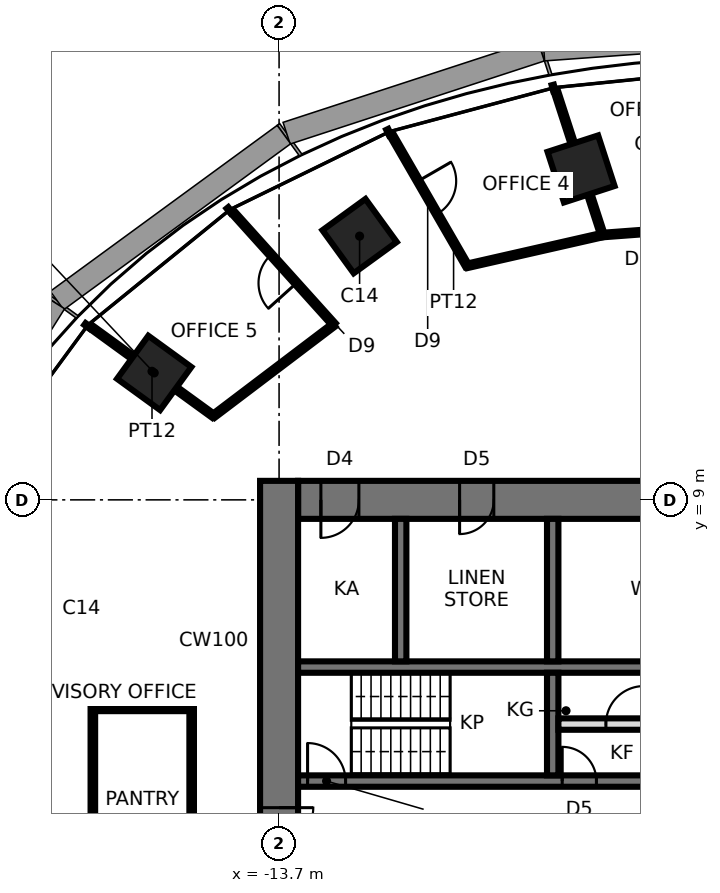
"""IFC4 building model, lengths in metres.
Left out: names, types, materials, properties, quantities, classifications, styles, units other than length and angle.
Written with IfcOpenShell. Run it as: python <this file> out.ifc"""

import sys

from ifc_helpers import new_model, si_unit, direction, frame, frame_2d, origin, origin_2d, place, context, subcontext, project, spatial, rectangle, extrude, element, fill, save


model = new_model("IFC4")
c1 = context("Model", 3, precision=1e-05, world=origin(), true_north=direction((0.0, 1.0)))
c2 = subcontext(c1, "Body", "Model", "MODEL_VIEW")
j1 = project(units=[si_unit("LENGTHUNIT", "METRE"), si_unit("PLANEANGLEUNIT", "RADIAN")], contexts=[c1])
p1 = place(None, origin())
s1 = spatial("IfcSite", under=j1, at=p1, CompositionType="ELEMENT")
p2 = place(p1, origin())
s2 = spatial("IfcBuilding", under=s1, at=p2, CompositionType="ELEMENT")
p3 = place(p2, frame((0.0, 0.0, 187.7)))
s3 = spatial("IfcBuildingStorey", under=s2, at=p3, CompositionType="ELEMENT", Elevation=187.7)
for number, where, z_axis, x_axis in (
    (1, (-5.754, 17.708, 0.0), (0.0, 0.0, 1.0), (-0.309, 0.951, 0.0)),
    (2, (-11.581, 15.94, 0.0), (0.0, 0.0, 1.0), (-0.588, 0.809, 0.0)),
    (3, (-16.986, 12.341, 0.0), (0.0, 0.0, 1.0), (-0.809, 0.588, 0.0)),
):
    element("IfcColumn", number, at=place(p3, frame(where, z_axis=z_axis, x_axis=x_axis)), inside=s3, PredefinedType="COLUMN", context=c2, shape_type="SweptSolid", body=[
        extrude(rectangle(XDim=1.4, YDim=1.4, at=origin_2d()), origin(), (0.0, 0.0, 1.0), 3.9),
    ])
p4 = place(p3, frame((13.2, 9.0, 0.0), z_axis=(0.0, 0.0, 1.0), x_axis=(-1.0, 0.0, 0.0)))
e4 = element("IfcWall", 4, at=p4, inside=s3, PredefinedType="SHEAR", context=c2, shape_type="SweptSolid", body=[
    extrude(rectangle(XDim=26.4, YDim=1.0, at=frame_2d((13.2, 0.0))), origin(), (0.0, 0.0, 1.0), 3.9),
])
p5 = place(p4, frame((2.65, 0.0, 0.0)))
e5 = element("IfcOpeningElement", 5, at=p5, cuts=e4, PredefinedType="OPENING", context=c2, shape_type="SweptSolid", body=[
    extrude(rectangle(XDim=0.9, YDim=2.1, at=frame_2d((0.45, 1.05))), frame((0.0, 0.51, 0.0), z_axis=(0.0, -1.0, 0.0), x_axis=(1.0, 0.0, 0.0)), (0.0, 0.0, 1.0), 1.02),
])
p6 = place(p4, frame((9.5, 0.0, 0.0)))
e6 = element("IfcOpeningElement", 6, at=p6, cuts=e4, PredefinedType="OPENING", context=c2, shape_type="SweptSolid", body=[
    extrude(rectangle(XDim=0.9, YDim=2.1, at=frame_2d((0.45, 1.05))), frame((0.0, 0.51, 0.0), z_axis=(0.0, -1.0, 0.0), x_axis=(1.0, 0.0, 0.0)), (0.0, 0.0, 1.0), 1.02),
])
p7 = place(p4, frame((16.0, 0.0, 0.0)))
e7 = element("IfcOpeningElement", 7, at=p7, cuts=e4, PredefinedType="OPENING", context=c2, shape_type="SweptSolid", body=[
    extrude(rectangle(XDim=0.9, YDim=2.1, at=frame_2d((0.45, 1.05))), frame((0.0, 0.51, 0.0), z_axis=(0.0, -1.0, 0.0), x_axis=(1.0, 0.0, 0.0)), (0.0, 0.0, 1.0), 1.02),
])
p8 = place(p4, frame((21.25, 0.0, 0.0)))
e8 = element("IfcOpeningElement", 8, at=p8, cuts=e4, PredefinedType="OPENING", context=c2, shape_type="SweptSolid", body=[
    extrude(rectangle(XDim=0.9, YDim=2.1, at=frame_2d((0.45, 1.05))), frame((0.0, 0.51, 0.0), z_axis=(0.0, -1.0, 0.0), x_axis=(1.0, 0.0, 0.0)), (0.0, 0.0, 1.0), 1.02),
])
p9 = place(p4, frame((24.8, 0.0, 0.0)))
e9 = element("IfcOpeningElement", 9, at=p9, cuts=e4, PredefinedType="OPENING", context=c2, shape_type="SweptSolid", body=[
    extrude(rectangle(XDim=1.0, YDim=2.1, at=frame_2d((0.5, 1.05))), frame((0.0, 0.51, 0.0), z_axis=(0.0, -1.0, 0.0), x_axis=(1.0, 0.0, 0.0)), (0.0, 0.0, 1.0), 1.02),
])
p10 = place(p3, frame((-13.7, 9.5, 0.0), z_axis=(0.0, 0.0, 1.0), x_axis=(0.0, -1.0, 0.0)))
e10 = element("IfcWall", 10, at=p10, inside=s3, PredefinedType="SHEAR", context=c2, shape_type="SweptSolid", body=[
    extrude(rectangle(XDim=19.0, YDim=1.0, at=frame_2d((9.5, 0.0))), origin(), (0.0, 0.0, 1.0), 3.9),
])
p11 = place(p10, frame((8.6, 0.0, 0.0)))
e11 = element("IfcOpeningElement", 11, at=p11, cuts=e10, PredefinedType="OPENING", context=c2, shape_type="SweptSolid", body=[
    extrude(rectangle(XDim=1.8, YDim=2.4, at=frame_2d((0.9, 1.2))), frame((0.0, 0.51, 0.0), z_axis=(0.0, -1.0, 0.0), x_axis=(1.0, 0.0, 0.0)), (0.0, 0.0, 1.0), 1.02),
])
p12 = place(p3, frame((-13.2, 1.6, 0.0), z_axis=(0.0, 0.0, 1.0), x_axis=(1.0, 0.0, 0.0)))
e12 = element("IfcWall", 12, at=p12, inside=s3, PredefinedType="SHEAR", context=c2, shape_type="SweptSolid", body=[
    extrude(rectangle(XDim=26.4, YDim=0.3, at=frame_2d((13.2, 0.0))), origin(), (0.0, 0.0, 1.0), 3.9),
])
p13 = place(p12, frame((0.25, 0.0, 0.0)))
e13 = element("IfcOpeningElement", 13, at=p13, cuts=e12, PredefinedType="OPENING", context=c2, shape_type="SweptSolid", body=[
    extrude(rectangle(XDim=1.0, YDim=2.1, at=frame_2d((0.5, 1.05))), frame((0.0, 0.16, 0.0), z_axis=(0.0, -1.0, 0.0), x_axis=(1.0, 0.0, 0.0)), (0.0, 0.0, 1.0), 0.32),
])
p14 = place(p12, frame((23.05, 0.0, 0.0)))
e14 = element("IfcOpeningElement", 14, at=p14, cuts=e12, PredefinedType="OPENING", context=c2, shape_type="SweptSolid", body=[
    extrude(rectangle(XDim=1.1, YDim=2.3, at=frame_2d((0.55, 1.15))), frame((0.0, 0.16, 0.0), z_axis=(0.0, -1.0, 0.0), x_axis=(1.0, 0.0, 0.0)), (0.0, 0.0, 1.0), 0.32),
])
p15 = place(p12, frame((20.25, 0.0, 0.0)))
e15 = element("IfcOpeningElement", 15, at=p15, cuts=e12, PredefinedType="OPENING", context=c2, shape_type="SweptSolid", body=[
    extrude(rectangle(XDim=1.5, YDim=2.4, at=frame_2d((0.75, 1.2))), frame((0.0, 0.16, 0.0), z_axis=(0.0, -1.0, 0.0), x_axis=(1.0, 0.0, 0.0)), (0.0, 0.0, 1.0), 0.32),
])
p16 = place(p12, frame((6.95, 0.0, 0.0)))
e16 = element("IfcOpeningElement", 16, at=p16, cuts=e12, PredefinedType="OPENING", context=c2, shape_type="SweptSolid", body=[
    extrude(rectangle(XDim=0.9, YDim=2.1, at=frame_2d((0.45, 1.05))), frame((0.0, 0.16, 0.0), z_axis=(0.0, -1.0, 0.0), x_axis=(1.0, 0.0, 0.0)), (0.0, 0.0, 1.0), 0.32),
])
p17 = place(p12, frame((9.55, 0.0, 0.0)))
e17 = element("IfcOpeningElement", 17, at=p17, cuts=e12, PredefinedType="OPENING", context=c2, shape_type="SweptSolid", body=[
    extrude(rectangle(XDim=0.9, YDim=2.1, at=frame_2d((0.45, 1.05))), frame((0.0, 0.16, 0.0), z_axis=(0.0, -1.0, 0.0), x_axis=(1.0, 0.0, 0.0)), (0.0, 0.0, 1.0), 0.32),
])
p18 = place(p12, frame((12.15, 0.0, 0.0)))
e18 = element("IfcOpeningElement", 18, at=p18, cuts=e12, PredefinedType="OPENING", context=c2, shape_type="SweptSolid", body=[
    extrude(rectangle(XDim=0.9, YDim=2.1, at=frame_2d((0.45, 1.05))), frame((0.0, 0.16, 0.0), z_axis=(0.0, -1.0, 0.0), x_axis=(1.0, 0.0, 0.0)), (0.0, 0.0, 1.0), 0.32),
])
p19 = place(p12, frame((25.45, 0.0, 0.0)))
e19 = element("IfcOpeningElement", 19, at=p19, cuts=e12, PredefinedType="OPENING", context=c2, shape_type="SweptSolid", body=[
    extrude(rectangle(XDim=0.9, YDim=2.1, at=frame_2d((0.45, 1.05))), frame((0.0, 0.16, 0.0), z_axis=(0.0, -1.0, 0.0), x_axis=(1.0, 0.0, 0.0)), (0.0, 0.0, 1.0), 0.32),
])
p20 = place(p3, frame((-13.2, 4.6, 0.0), z_axis=(0.0, 0.0, 1.0), x_axis=(1.0, 0.0, 0.0)))
e20 = element("IfcWall", 20, at=p20, inside=s3, PredefinedType="SHEAR", context=c2, shape_type="SweptSolid", body=[
    extrude(rectangle(XDim=26.4, YDim=0.3, at=frame_2d((13.2, 0.0))), origin(), (0.0, 0.0, 1.0), 3.9),
])
p21 = place(p3, frame((-6.5, 1.75, 0.0), z_axis=(0.0, 0.0, 1.0), x_axis=(0.0, 1.0, 0.0)))
e21 = element("IfcWall", 21, at=p21, inside=s3, PredefinedType="SHEAR", context=c2, shape_type="SweptSolid", body=[
    extrude(rectangle(XDim=2.7, YDim=0.3, at=frame_2d((1.35, 0.0))), origin(), (0.0, 0.0, 1.0), 3.9),
])
for number, where, z_axis, x_axis in (
    (22, (-6.5, 4.75, 0.0), (0.0, 0.0, 1.0), (0.0, 1.0, 0.0)),
    (23, (-10.5, 4.75, 0.0), (0.0, 0.0, 1.0), (0.0, 1.0, 0.0)),
):
    element("IfcWall", number, at=place(p3, frame(where, z_axis=z_axis, x_axis=x_axis)), inside=s3, PredefinedType="SHEAR", context=c2, shape_type="SweptSolid", body=[
        extrude(rectangle(XDim=3.75, YDim=0.3, at=frame_2d((1.875, 0.0))), origin(), (0.0, 0.0, 1.0), 3.9),
    ])
p22 = place(p3, frame((-6.35, 3.1, 0.0), z_axis=(0.0, 0.0, 1.0), x_axis=(1.0, 0.0, 0.0)))
e24 = element("IfcWall", 24, at=p22, inside=s3, PredefinedType="PARTITIONING", context=c2, shape_type="SweptSolid", body=[
    extrude(rectangle(XDim=2.35, YDim=0.3, at=frame_2d((1.175, 0.0))), origin(), (0.0, 0.0, 1.0), 3.74),
])
p23 = place(p22, frame((1.25, 0.0, 0.0)))
e25 = element("IfcOpeningElement", 25, at=p23, cuts=e24, PredefinedType="OPENING", context=c2, shape_type="SweptSolid", body=[
    extrude(rectangle(XDim=1.0, YDim=2.4, at=frame_2d((0.5, 1.2))), frame((0.0, 0.16, 0.0), z_axis=(0.0, -1.0, 0.0), x_axis=(1.0, 0.0, 0.0)), (0.0, 0.0, 1.0), 0.32),
])
p24 = place(p3, frame((-5.188, 15.969, 0.0), z_axis=(0.0, 0.0, 1.0), x_axis=(0.997219476507, 0.074520572167, 0.0)))
e26 = element("IfcWall", 26, at=p24, inside=s3, PredefinedType="PARTITIONING", context=c2, shape_type="SweptSolid", body=[
    extrude(rectangle(XDim=3.492, YDim=0.12, at=frame_2d((1.746, 0.0))), origin(), (0.0, 0.0, 1.0), 3.74),
])
p25 = place(p24, frame((1.221, 0.0, 0.0)))
e27 = element("IfcOpeningElement", 27, at=p25, cuts=e26, PredefinedType="OPENING", context=c2, shape_type="SweptSolid", body=[
    extrude(rectangle(XDim=1.0, YDim=2.4, at=frame_2d((0.5, 1.2))), frame((0.0, 0.07, 0.0), z_axis=(0.0, -1.0, 0.0), x_axis=(1.0, 0.0, 0.0)), (0.0, 0.0, 1.0), 0.14),
])
p26 = place(p3, frame((-5.188, 15.969, 0.0), z_axis=(0.0, 0.0, 1.0), x_axis=(-0.309022586479, 0.951054699292, 0.0)))
e28 = element("IfcWall", 28, at=p26, inside=s3, PredefinedType="PARTITIONING", context=c2, shape_type="SweptSolid", body=[
    extrude(rectangle(XDim=4.0, YDim=0.12, at=frame_2d((2.0, 0.0))), origin(), (0.0, 0.0, 1.0), 3.04),
])
p27 = place(p3, frame((-8.751, 15.158, 0.0), z_axis=(0.0, 0.0, 1.0), x_axis=(0.975057981002, 0.221950295525, 0.0)))
e29 = element("IfcWall", 29, at=p27, inside=s3, PredefinedType="PARTITIONING", context=c2, shape_type="SweptSolid", body=[
    extrude(rectangle(XDim=3.654, YDim=0.12, at=frame_2d((1.827, 0.0))), origin(), (0.0, 0.0, 1.0), 3.74),
])
p28 = place(p3, frame((-10.751, 18.622, 0.0), z_axis=(0.0, 0.0, 1.0), x_axis=(0.49999894854, -0.866026010844, 0.0)))
e30 = element("IfcWall", 30, at=p28, inside=s3, PredefinedType="PARTITIONING", context=c2, shape_type="SweptSolid", body=[
    extrude(rectangle(XDim=4.0, YDim=0.12, at=frame_2d((2.0, 0.0))), origin(), (0.0, 0.0, 1.0), 3.74),
])
p29 = place(p28, frame((1.423, 0.0, 0.0)))
e31 = element("IfcOpeningElement", 31, at=p29, cuts=e30, PredefinedType="OPENING", context=c2, shape_type="SweptSolid", body=[
    extrude(rectangle(XDim=1.0, YDim=2.4, at=frame_2d((0.5, 1.2))), frame((0.0, 0.07, 0.0), z_axis=(0.0, -1.0, 0.0), x_axis=(1.0, 0.0, 0.0)), (0.0, 0.0, 1.0), 0.14),
])
p30 = place(p3, frame((-12.255, 13.61, 0.0), z_axis=(0.0, 0.0, 1.0), x_axis=(-0.669119832037, 0.743154526579, 0.0)))
e32 = element("IfcWall", 32, at=p30, inside=s3, PredefinedType="PARTITIONING", context=c2, shape_type="SweptSolid", body=[
    extrude(rectangle(XDim=4.0, YDim=0.12, at=frame_2d((2.0, 0.0))), origin(), (0.0, 0.0, 1.0), 3.74),
])
p31 = place(p30, frame((1.474, 0.0, 0.0)))
e33 = element("IfcOpeningElement", 33, at=p31, cuts=e32, PredefinedType="OPENING", context=c2, shape_type="SweptSolid", body=[
    extrude(rectangle(XDim=1.0, YDim=2.4, at=frame_2d((0.5, 1.2))), frame((0.0, 0.07, 0.0), z_axis=(0.0, -1.0, 0.0), x_axis=(1.0, 0.0, 0.0)), (0.0, 0.0, 1.0), 0.14),
])
p32 = place(p3, frame((-15.426, 11.208, 0.0), z_axis=(0.0, 0.0, 1.0), x_axis=(0.796992780537, 0.603988830834, 0.0)))
e34 = element("IfcWall", 34, at=p32, inside=s3, PredefinedType="PARTITIONING", context=c2, shape_type="SweptSolid", body=[
    extrude(rectangle(XDim=3.978, YDim=0.12, at=frame_2d((1.989, 0.0))), origin(), (0.0, 0.0, 1.0), 3.334),
])
p33 = place(p3, frame((-18.662, 13.559, 0.0), z_axis=(0.0, 0.0, 1.0), x_axis=(0.809026317077, -0.587772420479, 0.0)))
e35 = element("IfcWall", 35, at=p33, inside=s3, PredefinedType="PARTITIONING", context=c2, shape_type="SweptSolid", body=[
    extrude(rectangle(XDim=4.0, YDim=0.12, at=frame_2d((2.0, 0.0))), origin(), (0.0, 0.0, 1.0), 3.04),
])
p34 = place(p3, frame((-18.6, 3.5, 0.0), z_axis=(0.0, 0.0, 1.0), x_axis=(1.0, 0.0, 0.0)))
e36 = element("IfcWall", 36, at=p34, inside=s3, PredefinedType="PARTITIONING", context=c2, shape_type="SweptSolid", body=[
    extrude(rectangle(XDim=2.6, YDim=0.12, at=frame_2d((1.3, 0.0))), origin(), (0.0, 0.0, 1.0), 3.74),
])
p35 = place(p3, frame((-18.6, -3.5, 0.0), z_axis=(0.0, 0.0, 1.0), x_axis=(0.0, 1.0, 0.0)))
e37 = element("IfcWall", 37, at=p35, inside=s3, PredefinedType="PARTITIONING", context=c2, shape_type="SweptSolid", body=[
    extrude(rectangle(XDim=7.0, YDim=0.12, at=frame_2d((3.5, 0.0))), origin(), (0.0, 0.0, 1.0), 3.334),
])
p36 = place(p35, frame((3.0, 0.0, 0.0)))
e38 = element("IfcOpeningElement", 38, at=p36, cuts=e37, PredefinedType="OPENING", context=c2, shape_type="SweptSolid", body=[
    extrude(rectangle(XDim=1.0, YDim=2.4, at=frame_2d((0.5, 1.2))), frame((0.0, 0.07, 0.0), z_axis=(0.0, -1.0, 0.0), x_axis=(1.0, 0.0, 0.0)), (0.0, 0.0, 1.0), 0.14),
])
p37 = place(p3, frame((-16.0, 3.5, 0.0), z_axis=(0.0, 0.0, 1.0), x_axis=(0.0, -1.0, 0.0)))
e39 = element("IfcWall", 39, at=p37, inside=s3, PredefinedType="PARTITIONING", context=c2, shape_type="SweptSolid", body=[
    extrude(rectangle(XDim=7.0, YDim=0.12, at=frame_2d((3.5, 0.0))), origin(), (0.0, 0.0, 1.0), 3.74),
])
p38 = place(p11, origin())
e40 = element("IfcDoor", 40, at=p38, inside=s3, OperationType="DOUBLE_DOOR_SINGLE_SWING", PredefinedType="DOOR", context=c2, shape_type="SweptSolid", body=[
    extrude(rectangle(XDim=1.72, YDim=2.36, at=frame_2d((0.9, 1.18))), frame((0.0, 0.025, 0.0), z_axis=(0.0, -1.0, 0.0), x_axis=(1.0, 0.0, 0.0)), (0.0, 0.0, 1.0), 0.05),
    extrude(rectangle(XDim=0.04, YDim=2.4, at=frame_2d((0.02, 1.2))), frame((0.0, 0.25, 0.0), z_axis=(0.0, -1.0, 0.0), x_axis=(1.0, 0.0, 0.0)), (0.0, 0.0, 1.0), 0.5),
    extrude(rectangle(XDim=0.04, YDim=2.4, at=frame_2d((1.78, 1.2))), frame((0.0, 0.25, 0.0), z_axis=(0.0, -1.0, 0.0), x_axis=(1.0, 0.0, 0.0)), (0.0, 0.0, 1.0), 0.5),
    extrude(rectangle(XDim=1.72, YDim=0.04, at=frame_2d((0.9, 2.38))), frame((0.0, 0.25, 0.0), z_axis=(0.0, -1.0, 0.0), x_axis=(1.0, 0.0, 0.0)), (0.0, 0.0, 1.0), 0.5),
])
fill(e11, e40)
p39 = place(p13, origin())
e41 = element("IfcDoor", 41, at=p39, inside=s3, OperationType="SINGLE_SWING_LEFT", PredefinedType="DOOR", context=c2, shape_type="SweptSolid", body=[
    extrude(rectangle(XDim=1.0, YDim=2.1, at=frame_2d((0.5, 1.05))), frame((0.0, 0.025, 0.0), z_axis=(0.0, -1.0, 0.0), x_axis=(1.0, 0.0, 0.0)), (0.0, 0.0, 1.0), 0.05),
])
fill(e13, e41)
p40 = place(p23, origin())
e42 = element("IfcDoor", 42, at=p40, inside=s3, OperationType="SINGLE_SWING_RIGHT", PredefinedType="DOOR", context=c2, shape_type="SweptSolid", body=[
    extrude(rectangle(XDim=1.0, YDim=2.4, at=frame_2d((0.5, 1.2))), frame((0.0, 0.025, 0.0), z_axis=(0.0, -1.0, 0.0), x_axis=(1.0, 0.0, 0.0)), (0.0, 0.0, 1.0), 0.05),
])
fill(e25, e42)
p41 = place(p16, origin())
e43 = element("IfcDoor", 43, at=p41, inside=s3, OperationType="SINGLE_SWING_LEFT", PredefinedType="DOOR", context=c2, shape_type="SweptSolid", body=[
    extrude(rectangle(XDim=0.9, YDim=2.1, at=frame_2d((0.45, 1.05))), frame((0.0, 0.025, 0.0), z_axis=(0.0, -1.0, 0.0), x_axis=(1.0, 0.0, 0.0)), (0.0, 0.0, 1.0), 0.05),
])
fill(e16, e43)
p42 = place(p8, origin())
e44 = element("IfcDoor", 44, at=p42, inside=s3, OperationType="SINGLE_SWING_RIGHT", PredefinedType="DOOR", context=c2, shape_type="SweptSolid", body=[
    extrude(rectangle(XDim=0.82, YDim=2.06, at=frame_2d((0.45, 1.03))), frame((0.0, 0.025, 0.0), z_axis=(0.0, -1.0, 0.0), x_axis=(1.0, 0.0, 0.0)), (0.0, 0.0, 1.0), 0.05),
    extrude(rectangle(XDim=0.04, YDim=2.1, at=frame_2d((0.02, 1.05))), frame((0.0, 0.25, 0.0), z_axis=(0.0, -1.0, 0.0), x_axis=(1.0, 0.0, 0.0)), (0.0, 0.0, 1.0), 0.5),
    extrude(rectangle(XDim=0.04, YDim=2.1, at=frame_2d((0.88, 1.05))), frame((0.0, 0.25, 0.0), z_axis=(0.0, -1.0, 0.0), x_axis=(1.0, 0.0, 0.0)), (0.0, 0.0, 1.0), 0.5),
    extrude(rectangle(XDim=0.82, YDim=0.04, at=frame_2d((0.45, 2.08))), frame((0.0, 0.25, 0.0), z_axis=(0.0, -1.0, 0.0), x_axis=(1.0, 0.0, 0.0)), (0.0, 0.0, 1.0), 0.5),
])
fill(e8, e44)
p43 = place(p9, origin())
e45 = element("IfcDoor", 45, at=p43, inside=s3, OperationType="SINGLE_SWING_RIGHT", PredefinedType="DOOR", context=c2, shape_type="SweptSolid", body=[
    extrude(rectangle(XDim=0.92, YDim=2.06, at=frame_2d((0.5, 1.03))), frame((0.0, 0.025, 0.0), z_axis=(0.0, -1.0, 0.0), x_axis=(1.0, 0.0, 0.0)), (0.0, 0.0, 1.0), 0.05),
    extrude(rectangle(XDim=0.04, YDim=2.1, at=frame_2d((0.02, 1.05))), frame((0.0, 0.25, 0.0), z_axis=(0.0, -1.0, 0.0), x_axis=(1.0, 0.0, 0.0)), (0.0, 0.0, 1.0), 0.5),
    extrude(rectangle(XDim=0.04, YDim=2.1, at=frame_2d((0.98, 1.05))), frame((0.0, 0.25, 0.0), z_axis=(0.0, -1.0, 0.0), x_axis=(1.0, 0.0, 0.0)), (0.0, 0.0, 1.0), 0.5),
    extrude(rectangle(XDim=0.92, YDim=0.04, at=frame_2d((0.5, 2.08))), frame((0.0, 0.25, 0.0), z_axis=(0.0, -1.0, 0.0), x_axis=(1.0, 0.0, 0.0)), (0.0, 0.0, 1.0), 0.5),
])
fill(e9, e45)
p44 = place(p29, origin())
e46 = element("IfcDoor", 46, at=p44, inside=s3, OperationType="SINGLE_SWING_LEFT", PredefinedType="DOOR", context=c2, shape_type="SweptSolid", body=[
    extrude(rectangle(XDim=1.0, YDim=2.4, at=frame_2d((0.5, 1.2))), frame((0.0, 0.025, 0.0), z_axis=(0.0, -1.0, 0.0), x_axis=(1.0, 0.0, 0.0)), (0.0, 0.0, 1.0), 0.05),
])
fill(e31, e46)
p45 = place(p31, origin())
e47 = element("IfcDoor", 47, at=p45, inside=s3, OperationType="SINGLE_SWING_LEFT", PredefinedType="DOOR", context=c2, shape_type="SweptSolid", body=[
    extrude(rectangle(XDim=1.0, YDim=2.4, at=frame_2d((0.5, 1.2))), frame((0.0, 0.025, 0.0), z_axis=(0.0, -1.0, 0.0), x_axis=(1.0, 0.0, 0.0)), (0.0, 0.0, 1.0), 0.05),
])
fill(e33, e47)
save(model, sys.argv[1])
